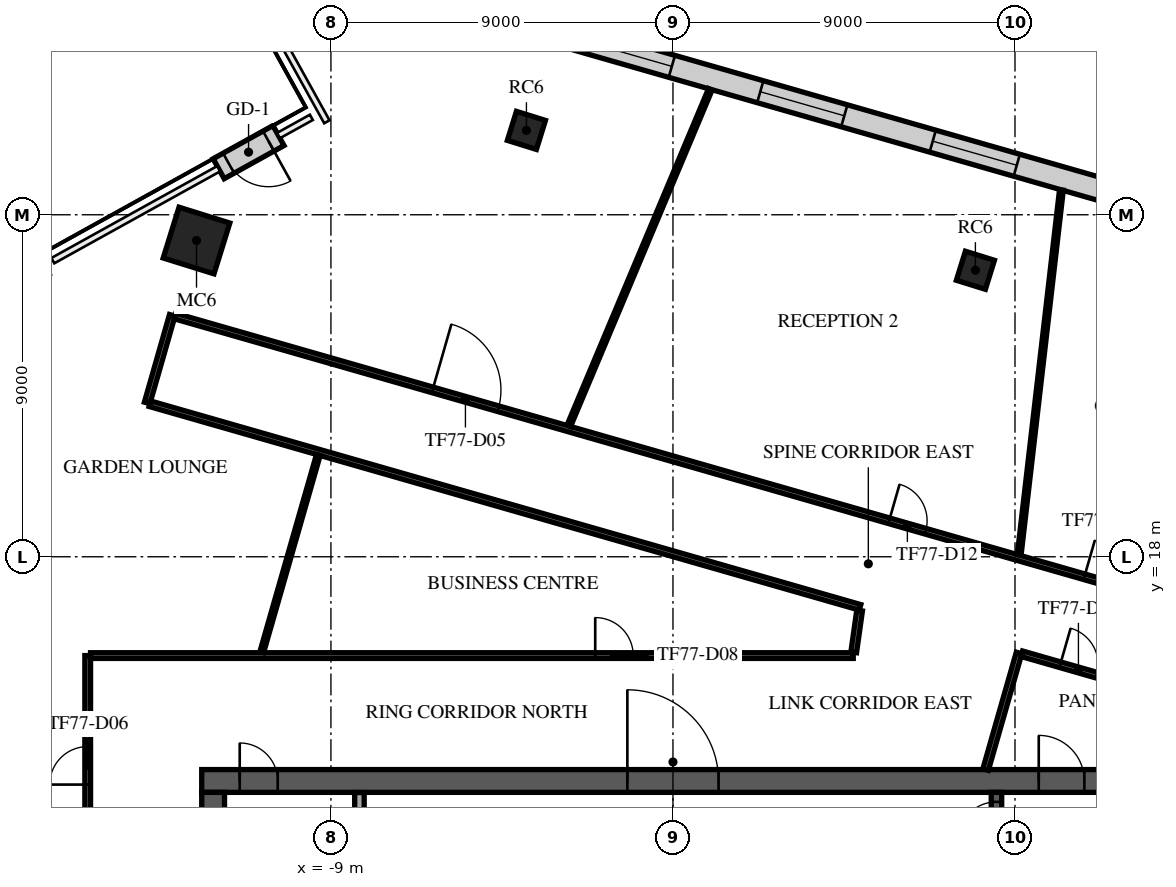
"""IFC4 building model, lengths in metres.
Left out: names, types, materials, properties, quantities, classifications, styles, units other than length and angle.
Written with IfcOpenShell. Run it as: python <this file> out.ifc"""

import sys

from ifc_helpers import new_model, si_unit, direction, frame, frame_2d, origin, origin_2d, place, context, subcontext, project, spatial, rectangle, extrude, element, fill, save


model = new_model("IFC4")
c1 = context("Model", 3, precision=1e-05, world=origin(), true_north=direction((0.0, 1.0)))
c2 = subcontext(c1, "Body", "Model", "MODEL_VIEW")
j1 = project(units=[si_unit("LENGTHUNIT", "METRE"), si_unit("PLANEANGLEUNIT", "RADIAN")], contexts=[c1])
p1 = place(None, origin())
s1 = spatial("IfcSite", under=j1, at=p1, CompositionType="ELEMENT")
p2 = place(p1, origin())
s2 = spatial("IfcBuilding", under=s1, at=p2, CompositionType="ELEMENT")
p3 = place(p2, frame((0.0, 0.0, 324.5)))
s3 = spatial("IfcBuildingStorey", under=s2, at=p3, CompositionType="ELEMENT", Elevation=324.5)
p4 = place(p3, frame((-12.537, 26.322, 0.0), z_axis=(0.0, 0.0, 1.0), x_axis=(0.297503182032, 0.954720826567, 0.0)))
e1 = element("IfcColumn", 1, at=p4, inside=s3, PredefinedType="COLUMN", context=c2, shape_type="SweptSolid", body=[
    extrude(rectangle(XDim=1.4, YDim=1.4, at=origin_2d()), origin(), (0.0, 0.0, 1.0), 4.0),
])
for number, where, z_axis, x_axis in (
    (2, (7.958, 25.539, 0.0), (0.0, 0.0, 1.0), (0.298, 0.955, 0.0)),
    (3, (-3.856, 29.22, 0.0), (0.0, 0.0, 1.0), (0.298, 0.955, 0.0)),
):
    element("IfcColumn", number, at=place(p3, frame(where, z_axis=z_axis, x_axis=x_axis)), inside=s3, PredefinedType="COLUMN", context=c2, shape_type="SweptSolid", body=[
        extrude(rectangle(XDim=0.8, YDim=0.8, at=origin_2d()), origin(), (0.0, 0.0, 1.0), 4.0),
    ])
p5 = place(p3, frame((-12.4, 12.1, 0.0), z_axis=(0.0, 0.0, 1.0), x_axis=(1.0, 0.0, 0.0)))
e4 = element("IfcWall", 4, at=p5, inside=s3, PredefinedType="SHEAR", context=c2, shape_type="SweptSolid", body=[
    extrude(rectangle(XDim=24.8, YDim=0.6, at=frame_2d((12.4, 0.0))), origin(), (0.0, 0.0, 1.0), 3.65),
])
p6 = place(p5, frame((11.2, 0.0, 0.0)))
e5 = element("IfcOpeningElement", 5, at=p6, cuts=e4, PredefinedType="OPENING", context=c2, shape_type="SweptSolid", body=[
    extrude(rectangle(XDim=2.4, YDim=2.4, at=frame_2d((1.2, 1.2))), frame((0.0, 0.31, 0.0), z_axis=(0.0, -1.0, 0.0), x_axis=(1.0, 0.0, 0.0)), (0.0, 0.0, 1.0), 0.62),
])
p7 = place(p5, frame((22.025, 0.0, 0.0)))
e6 = element("IfcOpeningElement", 6, at=p7, cuts=e4, PredefinedType="OPENING", context=c2, shape_type="SweptSolid", body=[
    extrude(rectangle(XDim=1.2, YDim=2.1, at=frame_2d((0.6, 1.05))), frame((0.0, 0.31, 0.0), z_axis=(0.0, -1.0, 0.0), x_axis=(1.0, 0.0, 0.0)), (0.0, 0.0, 1.0), 0.62),
])
p8 = place(p5, frame((1.0, 0.0, 0.0)))
e7 = element("IfcOpeningElement", 7, at=p8, cuts=e4, PredefinedType="OPENING", context=c2, shape_type="SweptSolid", body=[
    extrude(rectangle(XDim=1.0, YDim=2.1, at=frame_2d((0.5, 1.05))), frame((0.0, 0.31, 0.0), z_axis=(0.0, -1.0, 0.0), x_axis=(1.0, 0.0, 0.0)), (0.0, 0.0, 1.0), 0.62),
])
p9 = place(p3, frame((-12.1, -11.8, 0.0), z_axis=(0.0, 0.0, 1.0), x_axis=(0.0, 1.0, 0.0)))
e8 = element("IfcWall", 8, at=p9, inside=s3, PredefinedType="SHEAR", context=c2, shape_type="SweptSolid", body=[
    extrude(rectangle(XDim=23.6, YDim=0.6, at=frame_2d((11.8, 0.0))), origin(), (0.0, 0.0, 1.0), 3.65),
])
p10 = place(p9, frame((10.6, 0.0, 0.0)))
e9 = element("IfcOpeningElement", 9, at=p10, cuts=e8, PredefinedType="OPENING", context=c2, shape_type="SweptSolid", body=[
    extrude(rectangle(XDim=2.4, YDim=2.4, at=frame_2d((1.2, 1.2))), frame((0.0, 0.31, 0.0), z_axis=(0.0, -1.0, 0.0), x_axis=(1.0, 0.0, 0.0)), (0.0, 0.0, 1.0), 0.62),
])
p11 = place(p3, frame((8.512, 4.55, 0.0), z_axis=(0.0, 0.0, 1.0), x_axis=(0.0, 1.0, 0.0)))
e10 = element("IfcWall", 10, at=p11, inside=s3, PredefinedType="SOLIDWALL", context=c2, shape_type="SweptSolid", body=[
    extrude(rectangle(XDim=7.25, YDim=0.275, at=frame_2d((3.625, 0.0))), origin(), (0.0, 0.0, 1.0), 3.65),
])
p12 = place(p11, frame((6.0, 0.0, 0.0)))
e11 = element("IfcOpeningElement", 11, at=p12, cuts=e10, PredefinedType="OPENING", context=c2, shape_type="SweptSolid", body=[
    extrude(rectangle(XDim=1.0, YDim=2.1, at=frame_2d((0.5, 1.05))), frame((0.0, 0.147, 0.0), z_axis=(0.0, -1.0, 0.0), x_axis=(1.0, 0.0, 0.0)), (0.0, 0.0, 1.0), 0.295),
])
p13 = place(p3, frame((-8.25, 8.805, 0.0), z_axis=(0.0, 0.0, 1.0), x_axis=(0.0, 1.0, 0.0)))
e12 = element("IfcWall", 12, at=p13, inside=s3, PredefinedType="PARTITIONING", context=c2, shape_type="SweptSolid", body=[
    extrude(rectangle(XDim=2.99, YDim=0.25, at=frame_2d((1.495, 0.0))), origin(), (0.0, 0.0, 1.0), 3.65),
])
p14 = place(p13, frame((0.895, 0.0, 0.0)))
e13 = element("IfcOpeningElement", 13, at=p14, cuts=e12, PredefinedType="OPENING", context=c2, shape_type="SweptSolid", body=[
    extrude(rectangle(XDim=1.0, YDim=2.1, at=frame_2d((0.5, 1.05))), frame((0.0, 0.135, 0.0), z_axis=(0.0, -1.0, 0.0), x_axis=(1.0, 0.0, 0.0)), (0.0, 0.0, 1.0), 0.27),
])
p15 = place(p3, frame((28.363, 22.764, 0.0), z_axis=(0.0, 0.0, 1.0), x_axis=(-0.961261801459, 0.275636987823, 0.0)))
e14 = element("IfcWall", 14, at=p15, inside=s3, PredefinedType="STANDARD", context=c2, shape_type="SweptSolid", body=[
    extrude(rectangle(XDim=42.49, YDim=0.6, at=frame_2d((21.245, 0.0))), origin(), (0.0, 0.0, 1.0), 3.65),
])
p16 = place(p15, frame((1.21, 0.0, 0.9)))
e15 = element("IfcOpeningElement", 15, at=p16, cuts=e14, PredefinedType="OPENING", context=c2, shape_type="SweptSolid", body=[
    extrude(rectangle(XDim=2.3, YDim=2.1, at=frame_2d((1.15, 1.05))), frame((0.0, 0.31, 0.0), z_axis=(0.0, -1.0, 0.0), x_axis=(1.0, 0.0, 0.0)), (0.0, 0.0, 1.0), 0.62),
])
p17 = place(p15, frame((5.932, 0.0, 0.9)))
e16 = element("IfcOpeningElement", 16, at=p17, cuts=e14, PredefinedType="OPENING", context=c2, shape_type="SweptSolid", body=[
    extrude(rectangle(XDim=2.3, YDim=2.1, at=frame_2d((1.15, 1.05))), frame((0.0, 0.31, 0.0), z_axis=(0.0, -1.0, 0.0), x_axis=(1.0, 0.0, 0.0)), (0.0, 0.0, 1.0), 0.62),
])
p18 = place(p15, frame((10.653, 0.0, 0.9)))
e17 = element("IfcOpeningElement", 17, at=p18, cuts=e14, PredefinedType="OPENING", context=c2, shape_type="SweptSolid", body=[
    extrude(rectangle(XDim=2.3, YDim=2.1, at=frame_2d((1.15, 1.05))), frame((0.0, 0.31, 0.0), z_axis=(0.0, -1.0, 0.0), x_axis=(1.0, 0.0, 0.0)), (0.0, 0.0, 1.0), 0.62),
])
p19 = place(p15, frame((15.374, 0.0, 0.9)))
e18 = element("IfcOpeningElement", 18, at=p19, cuts=e14, PredefinedType="OPENING", context=c2, shape_type="SweptSolid", body=[
    extrude(rectangle(XDim=2.3, YDim=2.1, at=frame_2d((1.15, 1.05))), frame((0.0, 0.31, 0.0), z_axis=(0.0, -1.0, 0.0), x_axis=(1.0, 0.0, 0.0)), (0.0, 0.0, 1.0), 0.62),
])
p20 = place(p15, frame((20.095, 0.0, 0.9)))
e19 = element("IfcOpeningElement", 19, at=p20, cuts=e14, PredefinedType="OPENING", context=c2, shape_type="SweptSolid", body=[
    extrude(rectangle(XDim=2.3, YDim=2.1, at=frame_2d((1.15, 1.05))), frame((0.0, 0.31, 0.0), z_axis=(0.0, -1.0, 0.0), x_axis=(1.0, 0.0, 0.0)), (0.0, 0.0, 1.0), 0.62),
])
p21 = place(p15, frame((24.816, 0.0, 0.9)))
e20 = element("IfcOpeningElement", 20, at=p21, cuts=e14, PredefinedType="OPENING", context=c2, shape_type="SweptSolid", body=[
    extrude(rectangle(XDim=2.3, YDim=2.1, at=frame_2d((1.15, 1.05))), frame((0.0, 0.31, 0.0), z_axis=(0.0, -1.0, 0.0), x_axis=(1.0, 0.0, 0.0)), (0.0, 0.0, 1.0), 0.62),
])
p22 = place(p15, frame((29.537, 0.0, 0.9)))
e21 = element("IfcOpeningElement", 21, at=p22, cuts=e14, PredefinedType="OPENING", context=c2, shape_type="SweptSolid", body=[
    extrude(rectangle(XDim=2.3, YDim=2.1, at=frame_2d((1.15, 1.05))), frame((0.0, 0.31, 0.0), z_axis=(0.0, -1.0, 0.0), x_axis=(1.0, 0.0, 0.0)), (0.0, 0.0, 1.0), 0.62),
])
p23 = place(p15, frame((34.258, 0.0, 0.9)))
e22 = element("IfcOpeningElement", 22, at=p23, cuts=e14, PredefinedType="OPENING", context=c2, shape_type="SweptSolid", body=[
    extrude(rectangle(XDim=2.3, YDim=2.1, at=frame_2d((1.15, 1.05))), frame((0.0, 0.31, 0.0), z_axis=(0.0, -1.0, 0.0), x_axis=(1.0, 0.0, 0.0)), (0.0, 0.0, 1.0), 0.62),
])
p24 = place(p15, frame((38.979, 0.0, 0.9)))
e23 = element("IfcOpeningElement", 23, at=p24, cuts=e14, PredefinedType="OPENING", context=c2, shape_type="SweptSolid", body=[
    extrude(rectangle(XDim=2.3, YDim=2.1, at=frame_2d((1.15, 1.05))), frame((0.0, 0.31, 0.0), z_axis=(0.0, -1.0, 0.0), x_axis=(1.0, 0.0, 0.0)), (0.0, 0.0, 1.0), 0.62),
])
p25 = place(p3, frame((-10.38, 29.084, 0.0), z_axis=(0.0, 0.0, 1.0), x_axis=(-0.874604701954, -0.484836689329, 0.0)))
e24 = element("IfcWall", 24, at=p25, inside=s3, PredefinedType="STANDARD", context=c2, shape_type="SweptSolid", body=[
    extrude(rectangle(XDim=1.8, YDim=0.6, at=frame_2d((0.9, 0.0))), origin(), (0.0, 0.0, 1.0), 3.65),
])
p26 = place(p25, frame((0.3, 0.0, 0.0)))
e25 = element("IfcOpeningElement", 25, at=p26, cuts=e24, PredefinedType="OPENING", context=c2, shape_type="SweptSolid", body=[
    extrude(rectangle(XDim=1.2, YDim=2.4, at=frame_2d((0.6, 1.2))), frame((0.0, 0.31, 0.0), z_axis=(0.0, -1.0, 0.0), x_axis=(1.0, 0.0, 0.0)), (0.0, 0.0, 1.0), 0.62),
])
p27 = place(p3, frame((-15.4, -13.565, 0.0), z_axis=(0.0, 0.0, 1.0), x_axis=(0.0, 1.0, 0.0)))
e26 = element("IfcWall", 26, at=p27, inside=s3, PredefinedType="PARTITIONING", context=c2, shape_type="SweptSolid", body=[
    extrude(rectangle(XDim=28.965, YDim=0.15, at=frame_2d((14.483, 0.0))), origin(), (0.0, 0.0, 1.0), 3.25),
])
p28 = place(p27, frame((5.986, 0.0, 0.0)))
e27 = element("IfcOpeningElement", 27, at=p28, cuts=e26, PredefinedType="OPENING", context=c2, shape_type="SweptSolid", body=[
    extrude(rectangle(XDim=1.0, YDim=2.1, at=frame_2d((0.5, 1.05))), frame((0.0, 0.085, 0.0), z_axis=(0.0, -1.0, 0.0), x_axis=(1.0, 0.0, 0.0)), (0.0, 0.0, 1.0), 0.17),
])
p29 = place(p27, frame((17.249, 0.0, 0.0)))
e28 = element("IfcOpeningElement", 28, at=p29, cuts=e26, PredefinedType="OPENING", context=c2, shape_type="SweptSolid", body=[
    extrude(rectangle(XDim=1.0, YDim=2.1, at=frame_2d((0.5, 1.05))), frame((0.0, 0.085, 0.0), z_axis=(0.0, -1.0, 0.0), x_axis=(1.0, 0.0, 0.0)), (0.0, 0.0, 1.0), 0.17),
])
p30 = place(p27, frame((25.571, 0.0, 0.0)))
e29 = element("IfcOpeningElement", 29, at=p30, cuts=e26, PredefinedType="OPENING", context=c2, shape_type="SweptSolid", body=[
    extrude(rectangle(XDim=1.0, YDim=2.1, at=frame_2d((0.5, 1.05))), frame((0.0, 0.085, 0.0), z_axis=(0.0, -1.0, 0.0), x_axis=(1.0, 0.0, 0.0)), (0.0, 0.0, 1.0), 0.17),
])
p31 = place(p3, frame((-15.325, 15.4, 0.0), z_axis=(0.0, 0.0, 1.0), x_axis=(1.0, 0.0, 0.0)))
e30 = element("IfcWall", 30, at=p31, inside=s3, PredefinedType="PARTITIONING", context=c2, shape_type="SweptSolid", body=[
    extrude(rectangle(XDim=20.069, YDim=0.15, at=frame_2d((10.034, 0.0))), origin(), (0.0, 0.0, 1.0), 3.25),
])
p32 = place(p31, frame((13.279, 0.0, 0.0)))
e31 = element("IfcOpeningElement", 31, at=p32, cuts=e30, PredefinedType="OPENING", context=c2, shape_type="SweptSolid", body=[
    extrude(rectangle(XDim=1.0, YDim=2.1, at=frame_2d((0.5, 1.05))), frame((0.0, 0.085, 0.0), z_axis=(0.0, -1.0, 0.0), x_axis=(1.0, 0.0, 0.0)), (0.0, 0.0, 1.0), 0.17),
])
p33 = place(p3, frame((-13.836, 22.048, 0.0), z_axis=(0.0, 0.0, 1.0), x_axis=(0.275406353885, 0.96132790464, 0.0)))
e32 = element("IfcWall", 32, at=p33, inside=s3, PredefinedType="PARTITIONING", context=c2, shape_type="SweptSolid", body=[
    extrude(rectangle(XDim=2.4, YDim=0.15, at=frame_2d((1.2, 0.0))), origin(), (0.0, 0.0, 1.0), 3.65),
])
p34 = place(p3, frame((-13.764, 22.027, 0.0), z_axis=(0.0, 0.0, 1.0), x_axis=(0.961261913281, -0.275636597851, 0.0)))
e33 = element("IfcWall", 33, at=p34, inside=s3, PredefinedType="PARTITIONING", context=c2, shape_type="SweptSolid", body=[
    extrude(rectangle(XDim=19.44, YDim=0.15, at=frame_2d((9.72, 0.0))), origin(), (0.0, 0.0, 1.0), 3.25),
])
p35 = place(p3, frame((-13.103, 24.334, 0.0), z_axis=(0.0, 0.0, 1.0), x_axis=(0.961265813226, -0.275622996723, 0.0)))
e34 = element("IfcWall", 34, at=p35, inside=s3, PredefinedType="PARTITIONING", context=c2, shape_type="SweptSolid", body=[
    extrude(rectangle(XDim=38.68, YDim=0.15, at=frame_2d((19.34, 0.0))), origin(), (0.0, 0.0, 1.0), 3.25),
])
p36 = place(p35, frame((7.05, 0.0, 0.0)))
e35 = element("IfcOpeningElement", 35, at=p36, cuts=e34, PredefinedType="OPENING", context=c2, shape_type="SweptSolid", body=[
    extrude(rectangle(XDim=1.8, YDim=2.1, at=frame_2d((0.9, 1.05))), frame((0.0, 0.085, 0.0), z_axis=(0.0, -1.0, 0.0), x_axis=(1.0, 0.0, 0.0)), (0.0, 0.0, 1.0), 0.17),
])
p37 = place(p35, frame((19.547, 0.0, 0.0)))
e36 = element("IfcOpeningElement", 36, at=p37, cuts=e34, PredefinedType="OPENING", context=c2, shape_type="SweptSolid", body=[
    extrude(rectangle(XDim=1.0, YDim=2.1, at=frame_2d((0.5, 1.05))), frame((0.0, 0.085, 0.0), z_axis=(0.0, -1.0, 0.0), x_axis=(1.0, 0.0, 0.0)), (0.0, 0.0, 1.0), 0.17),
])
p38 = place(p35, frame((24.893, 0.0, 0.0)))
e37 = element("IfcOpeningElement", 37, at=p38, cuts=e34, PredefinedType="OPENING", context=c2, shape_type="SweptSolid", body=[
    extrude(rectangle(XDim=1.0, YDim=2.1, at=frame_2d((0.5, 1.05))), frame((0.0, 0.085, 0.0), z_axis=(0.0, -1.0, 0.0), x_axis=(1.0, 0.0, 0.0)), (0.0, 0.0, 1.0), 0.17),
])
p39 = place(p35, frame((31.243, 0.0, 0.0)))
e38 = element("IfcOpeningElement", 38, at=p39, cuts=e34, PredefinedType="OPENING", context=c2, shape_type="SweptSolid", body=[
    extrude(rectangle(XDim=1.8, YDim=2.1, at=frame_2d((0.9, 1.05))), frame((0.0, 0.085, 0.0), z_axis=(0.0, -1.0, 0.0), x_axis=(1.0, 0.0, 0.0)), (0.0, 0.0, 1.0), 0.17),
])
p40 = place(p3, frame((4.756, 15.486, 0.0), z_axis=(0.0, 0.0, 1.0), x_axis=(0.139602323869, 0.990207650531, 0.0)))
e39 = element("IfcWall", 39, at=p40, inside=s3, PredefinedType="PARTITIONING", context=c2, shape_type="SweptSolid", body=[
    extrude(rectangle(XDim=1.109, YDim=0.15, at=frame_2d((0.554, 0.0))), origin(), (0.0, 0.0, 1.0), 3.65),
])
p41 = place(p3, frame((8.227, 12.4, 0.0), z_axis=(0.0, 0.0, 1.0), x_axis=(0.275589573409, 0.961275396038, 0.0)))
e40 = element("IfcWall", 40, at=p41, inside=s3, PredefinedType="PARTITIONING", context=c2, shape_type="SweptSolid", body=[
    extrude(rectangle(XDim=3.193, YDim=0.15, at=frame_2d((1.596, 0.0))), origin(), (0.0, 0.0, 1.0), 3.25),
])
p42 = place(p3, frame((9.179, 15.448, 0.0), z_axis=(0.0, 0.0, 1.0), x_axis=(0.961267886057, -0.275615767392, 0.0)))
e41 = element("IfcWall", 41, at=p42, inside=s3, PredefinedType="PARTITIONING", context=c2, shape_type="SweptSolid", body=[
    extrude(rectangle(XDim=14.812, YDim=0.15, at=frame_2d((7.406, 0.0))), origin(), (0.0, 0.0, 1.0), 3.25),
])
p43 = place(p42, frame((1.05, 0.0, 0.0)))
e42 = element("IfcOpeningElement", 42, at=p43, cuts=e41, PredefinedType="OPENING", context=c2, shape_type="SweptSolid", body=[
    extrude(rectangle(XDim=1.0, YDim=2.1, at=frame_2d((0.5, 1.05))), frame((0.0, 0.085, 0.0), z_axis=(0.0, -1.0, 0.0), x_axis=(1.0, 0.0, 0.0)), (0.0, 0.0, 1.0), 0.17),
])
p44 = place(p3, frame((-10.821, 15.489, 0.0), z_axis=(0.0, 0.0, 1.0), x_axis=(0.275724251057, 0.961236774879, 0.0)))
e43 = element("IfcWall", 43, at=p44, inside=s3, PredefinedType="PARTITIONING", context=c2, shape_type="SweptSolid", body=[
    extrude(rectangle(XDim=5.399, YDim=0.1, at=frame_2d((2.7, 0.0))), origin(), (0.0, 0.0, 1.0), 3.65),
])
p45 = place(p3, frame((-2.74, 21.447, 0.0), z_axis=(0.0, 0.0, 1.0), x_axis=(0.387658102022, 0.921803230596, 0.0)))
e44 = element("IfcWall", 44, at=p45, inside=s3, PredefinedType="PARTITIONING", context=c2, shape_type="SweptSolid", body=[
    extrude(rectangle(XDim=9.605, YDim=0.1, at=frame_2d((4.802, 0.0))), origin(), (0.0, 0.0, 1.0), 3.05),
])
p46 = place(p3, frame((9.111, 18.052, 0.0), z_axis=(0.0, 0.0, 1.0), x_axis=(0.114972177947, 0.99336871216, 0.0)))
e45 = element("IfcWall", 45, at=p46, inside=s3, PredefinedType="PARTITIONING", context=c2, shape_type="SweptSolid", body=[
    extrude(rectangle(XDim=9.664, YDim=0.1, at=frame_2d((4.832, 0.0))), origin(), (0.0, 0.0, 1.0), 3.05),
])
p47 = place(p6, origin())
e46 = element("IfcDoor", 46, at=p47, inside=s3, OperationType="SINGLE_SWING_LEFT", PredefinedType="DOOR", context=c2, shape_type="SweptSolid", body=[
    extrude(rectangle(XDim=2.4, YDim=2.4, at=frame_2d((1.2, 1.2))), frame((0.0, 0.025, 0.0), z_axis=(0.0, -1.0, 0.0), x_axis=(1.0, 0.0, 0.0)), (0.0, 0.0, 1.0), 0.05),
])
fill(e5, e46)
p48 = place(p7, origin())
e47 = element("IfcDoor", 47, at=p48, inside=s3, OperationType="SINGLE_SWING_LEFT", PredefinedType="DOOR", context=c2, shape_type="SweptSolid", body=[
    extrude(rectangle(XDim=1.2, YDim=2.1, at=frame_2d((0.6, 1.05))), frame((0.0, 0.025, 0.0), z_axis=(0.0, -1.0, 0.0), x_axis=(1.0, 0.0, 0.0)), (0.0, 0.0, 1.0), 0.05),
])
fill(e6, e47)
p49 = place(p8, origin())
e48 = element("IfcDoor", 48, at=p49, inside=s3, OperationType="SINGLE_SWING_LEFT", PredefinedType="DOOR", context=c2, shape_type="SweptSolid", body=[
    extrude(rectangle(XDim=1.0, YDim=2.1, at=frame_2d((0.5, 1.05))), frame((0.0, 0.025, 0.0), z_axis=(0.0, -1.0, 0.0), x_axis=(1.0, 0.0, 0.0)), (0.0, 0.0, 1.0), 0.05),
])
fill(e7, e48)
p50 = place(p12, origin())
e49 = element("IfcDoor", 49, at=p50, inside=s3, OperationType="SINGLE_SWING_LEFT", PredefinedType="DOOR", context=c2, shape_type="SweptSolid", body=[
    extrude(rectangle(XDim=1.0, YDim=2.1, at=frame_2d((0.5, 1.05))), frame((0.0, 0.025, 0.0), z_axis=(0.0, -1.0, 0.0), x_axis=(1.0, 0.0, 0.0)), (0.0, 0.0, 1.0), 0.05),
])
fill(e11, e49)
p51 = place(p20, origin())
e50 = element("IfcWindow", 50, at=p51, inside=s3, PartitioningType="SINGLE_PANEL", PredefinedType="WINDOW", context=c2, shape_type="SweptSolid", body=[
    extrude(rectangle(XDim=2.3, YDim=2.1, at=frame_2d((1.15, 1.05))), frame((0.0, 0.03, 0.0), z_axis=(0.0, -1.0, 0.0), x_axis=(1.0, 0.0, 0.0)), (0.0, 0.0, 1.0), 0.06),
])
fill(e19, e50)
p52 = place(p21, origin())
e51 = element("IfcWindow", 51, at=p52, inside=s3, PartitioningType="SINGLE_PANEL", PredefinedType="WINDOW", context=c2, shape_type="SweptSolid", body=[
    extrude(rectangle(XDim=2.3, YDim=2.1, at=frame_2d((1.15, 1.05))), frame((0.0, 0.03, 0.0), z_axis=(0.0, -1.0, 0.0), x_axis=(1.0, 0.0, 0.0)), (0.0, 0.0, 1.0), 0.06),
])
fill(e20, e51)
p53 = place(p22, origin())
e52 = element("IfcWindow", 52, at=p53, inside=s3, PartitioningType="SINGLE_PANEL", PredefinedType="WINDOW", context=c2, shape_type="SweptSolid", body=[
    extrude(rectangle(XDim=2.3, YDim=2.1, at=frame_2d((1.15, 1.05))), frame((0.0, 0.03, 0.0), z_axis=(0.0, -1.0, 0.0), x_axis=(1.0, 0.0, 0.0)), (0.0, 0.0, 1.0), 0.06),
])
fill(e21, e52)
p54 = place(p26, origin())
e53 = element("IfcDoor", 53, at=p54, inside=s3, OperationType="SINGLE_SWING_LEFT", PredefinedType="DOOR", context=c2, shape_type="SweptSolid", body=[
    extrude(rectangle(XDim=1.2, YDim=2.4, at=frame_2d((0.6, 1.2))), frame((0.0, 0.025, 0.0), z_axis=(0.0, -1.0, 0.0), x_axis=(1.0, 0.0, 0.0)), (0.0, 0.0, 1.0), 0.05),
])
fill(e25, e53)
p55 = place(p36, origin())
e54 = element("IfcDoor", 54, at=p55, inside=s3, OperationType="DOUBLE_DOOR_SINGLE_SWING", PredefinedType="DOOR", context=c2, shape_type="SweptSolid", body=[
    extrude(rectangle(XDim=1.8, YDim=2.1, at=frame_2d((0.9, 1.05))), frame((0.0, 0.025, 0.0), z_axis=(0.0, -1.0, 0.0), x_axis=(1.0, 0.0, 0.0)), (0.0, 0.0, 1.0), 0.05),
])
fill(e35, e54)
p56 = place(p30, origin())
e55 = element("IfcDoor", 55, at=p56, inside=s3, OperationType="SINGLE_SWING_LEFT", PredefinedType="DOOR", context=c2, shape_type="SweptSolid", body=[
    extrude(rectangle(XDim=1.0, YDim=2.1, at=frame_2d((0.5, 1.05))), frame((0.0, 0.025, 0.0), z_axis=(0.0, -1.0, 0.0), x_axis=(1.0, 0.0, 0.0)), (0.0, 0.0, 1.0), 0.05),
])
fill(e29, e55)
p57 = place(p32, origin())
e56 = element("IfcDoor", 56, at=p57, inside=s3, OperationType="SINGLE_SWING_LEFT", PredefinedType="DOOR", context=c2, shape_type="SweptSolid", body=[
    extrude(rectangle(XDim=1.0, YDim=2.1, at=frame_2d((0.5, 1.05))), frame((0.0, 0.025, 0.0), z_axis=(0.0, -1.0, 0.0), x_axis=(1.0, 0.0, 0.0)), (0.0, 0.0, 1.0), 0.05),
])
fill(e31, e56)
p58 = place(p37, origin())
e57 = element("IfcDoor", 57, at=p58, inside=s3, OperationType="SINGLE_SWING_RIGHT", PredefinedType="DOOR", context=c2, shape_type="SweptSolid", body=[
    extrude(rectangle(XDim=1.0, YDim=2.1, at=frame_2d((0.5, 1.05))), frame((0.0, 0.025, 0.0), z_axis=(0.0, -1.0, 0.0), x_axis=(1.0, 0.0, 0.0)), (0.0, 0.0, 1.0), 0.05),
])
fill(e36, e57)
p59 = place(p43, frame((1.0, 0.0, 0.0), z_axis=(0.0, 0.0, 1.0), x_axis=(-1.0, 0.0, 0.0)))
e58 = element("IfcDoor", 58, at=p59, inside=s3, OperationType="SINGLE_SWING_RIGHT", PredefinedType="DOOR", context=c2, shape_type="SweptSolid", body=[
    extrude(rectangle(XDim=1.0, YDim=2.1, at=frame_2d((0.5, 1.05))), frame((0.0, 0.025, 0.0), z_axis=(0.0, -1.0, 0.0), x_axis=(1.0, 0.0, 0.0)), (0.0, 0.0, 1.0), 0.05),
])
fill(e42, e58)
p60 = place(p38, origin())
e59 = element("IfcDoor", 59, at=p60, inside=s3, OperationType="SINGLE_SWING_LEFT", PredefinedType="DOOR", context=c2, shape_type="SweptSolid", body=[
    extrude(rectangle(XDim=1.0, YDim=2.1, at=frame_2d((0.5, 1.05))), frame((0.0, 0.025, 0.0), z_axis=(0.0, -1.0, 0.0), x_axis=(1.0, 0.0, 0.0)), (0.0, 0.0, 1.0), 0.05),
])
fill(e37, e59)
save(model, sys.argv[1])
